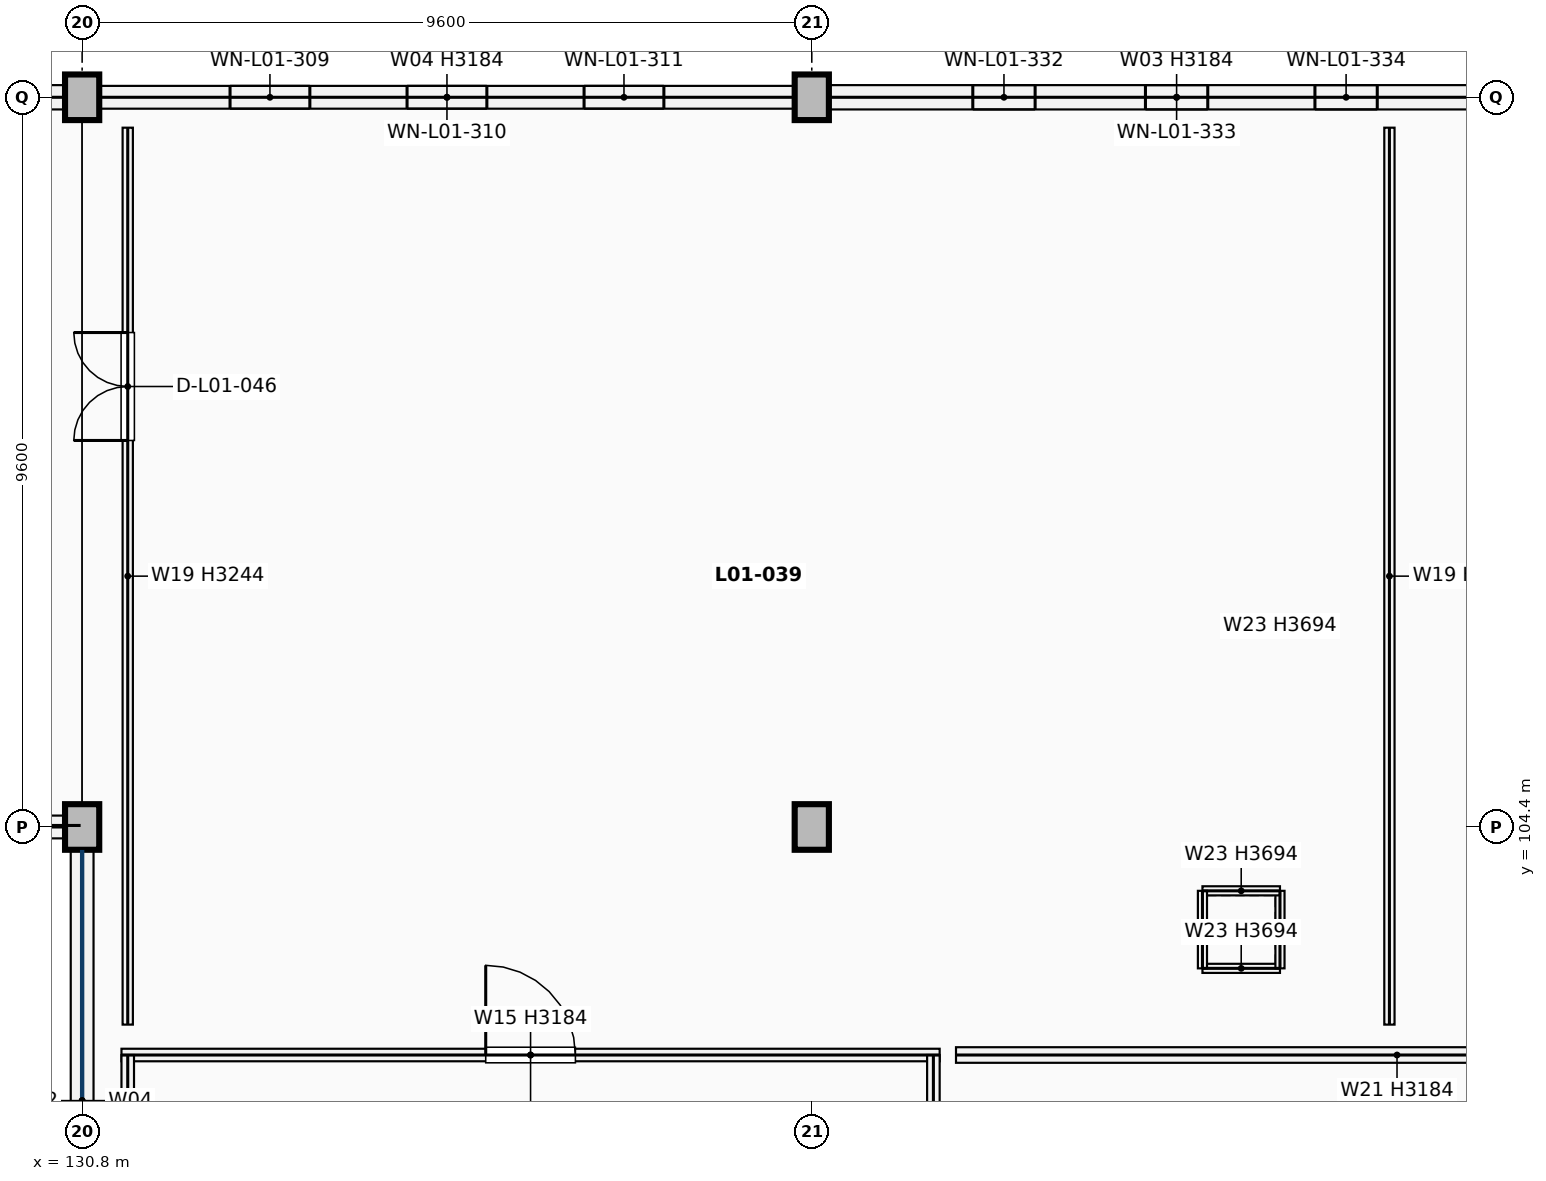
"""IFC4 building model, lengths in metres.
Left out: names, types, materials, properties, quantities, classifications, styles, units other than length and angle.
Written with IfcOpenShell. Run it as: python <this file> out.ifc"""

import sys

from ifc_helpers import new_model, si_unit, direction, frame, frame_2d, origin, origin_2d, place, context, subcontext, project, spatial, rectangle, extrude, element, fill, save


model = new_model("IFC4")
c1 = context("Model", 3, precision=1e-05, world=origin(), true_north=direction((0.0, 1.0)))
c2 = subcontext(c1, "Body", "Model", "MODEL_VIEW")
j1 = project(units=[si_unit("LENGTHUNIT", "METRE"), si_unit("PLANEANGLEUNIT", "RADIAN")], contexts=[c1])
p1 = place(None, origin())
s1 = spatial("IfcSite", under=j1, at=p1, CompositionType="ELEMENT")
p2 = place(p1, origin())
s2 = spatial("IfcBuilding", under=s1, at=p2, CompositionType="ELEMENT")
p3 = place(p2, frame((0.0, 0.0, 5.1)))
s3 = spatial("IfcBuildingStorey", under=s2, at=p3, CompositionType="ELEMENT", Elevation=5.1)
for number, where, z_axis, x_axis in (
    (1, (130.8, 104.4, 0.0), (0.0, 0.0, 1.0), (1.0, 0.0, 0.0)),
    (2, (130.8, 114.0, 0.0), (0.0, 0.0, 1.0), (1.0, 0.0, 0.0)),
    (3, (140.4, 104.4, 0.0), (0.0, 0.0, 1.0), (1.0, 0.0, 0.0)),
    (4, (140.4, 114.0, 0.0), (0.0, 0.0, 1.0), (1.0, 0.0, 0.0)),
):
    element("IfcColumn", number, at=place(p3, frame(where, z_axis=z_axis, x_axis=x_axis)), inside=s3, PredefinedType="COLUMN", context=c2, shape_type="SweptSolid", body=[
        extrude(rectangle(XDim=0.45, YDim=0.6, at=origin_2d()), origin(), (0.0, 0.0, 1.0), 4.42),
    ])
p4 = place(p3, frame((127.427, 114.0, 0.0), z_axis=(0.0, 0.0, 1.0), x_axis=(1.0, 0.0, 0.0)))
e5 = element("IfcWall", 5, at=p4, inside=s3, PredefinedType="SOLIDWALL", context=c2, shape_type="SweptSolid", body=[
    extrude(rectangle(XDim=3.146, YDim=0.32, at=frame_2d((1.573, 0.0))), origin(), (0.0, 0.0, 1.0), 3.184),
])
p5 = place(p4, frame((1.048, 0.0, 0.75)))
e6 = element("IfcOpeningElement", 6, at=p5, cuts=e5, PredefinedType="OPENING", context=c2, shape_type="SweptSolid", body=[
    extrude(rectangle(XDim=1.05, YDim=1.9, at=frame_2d((0.525, 0.95))), frame((0.0, 0.17, 0.0), z_axis=(0.0, -1.0, 0.0), x_axis=(1.0, 0.0, 0.0)), (0.0, 0.0, 1.0), 0.34),
])
p6 = place(p3, frame((131.027, 114.0, 0.0), z_axis=(0.0, 0.0, 1.0), x_axis=(1.0, 0.0, 0.0)))
e7 = element("IfcWall", 7, at=p6, inside=s3, PredefinedType="SOLIDWALL", context=c2, shape_type="SweptSolid", body=[
    extrude(rectangle(XDim=9.146, YDim=0.3, at=frame_2d((4.573, 0.0))), origin(), (0.0, 0.0, 1.0), 3.184),
])
p7 = place(p6, frame((1.719, 0.0, 0.75)))
e8 = element("IfcOpeningElement", 8, at=p7, cuts=e7, PredefinedType="OPENING", context=c2, shape_type="SweptSolid", body=[
    extrude(rectangle(XDim=1.05, YDim=1.7, at=frame_2d((0.525, 0.85))), frame((0.0, 0.16, 0.0), z_axis=(0.0, -1.0, 0.0), x_axis=(1.0, 0.0, 0.0)), (0.0, 0.0, 1.0), 0.32),
])
p8 = place(p6, frame((4.048, 0.0, 0.75)))
e9 = element("IfcOpeningElement", 9, at=p8, cuts=e7, PredefinedType="OPENING", context=c2, shape_type="SweptSolid", body=[
    extrude(rectangle(XDim=1.05, YDim=1.7, at=frame_2d((0.525, 0.85))), frame((0.0, 0.16, 0.0), z_axis=(0.0, -1.0, 0.0), x_axis=(1.0, 0.0, 0.0)), (0.0, 0.0, 1.0), 0.32),
])
p9 = place(p6, frame((6.377, 0.0, 0.75)))
e10 = element("IfcOpeningElement", 10, at=p9, cuts=e7, PredefinedType="OPENING", context=c2, shape_type="SweptSolid", body=[
    extrude(rectangle(XDim=1.05, YDim=1.7, at=frame_2d((0.525, 0.85))), frame((0.0, 0.16, 0.0), z_axis=(0.0, -1.0, 0.0), x_axis=(1.0, 0.0, 0.0)), (0.0, 0.0, 1.0), 0.32),
])
p10 = place(p3, frame((140.627, 114.0, 0.0), z_axis=(0.0, 0.0, 1.0), x_axis=(1.0, 0.0, 0.0)))
e11 = element("IfcWall", 11, at=p10, inside=s3, PredefinedType="SOLIDWALL", context=c2, shape_type="SweptSolid", body=[
    extrude(rectangle(XDim=9.146, YDim=0.32, at=frame_2d((4.573, 0.0))), origin(), (0.0, 0.0, 1.0), 3.184),
])
p11 = place(p10, frame((1.892, 0.0, 0.75)))
e12 = element("IfcOpeningElement", 12, at=p11, cuts=e11, PredefinedType="OPENING", context=c2, shape_type="SweptSolid", body=[
    extrude(rectangle(XDim=0.82, YDim=2.22, at=frame_2d((0.41, 1.11))), frame((0.0, 0.17, 0.0), z_axis=(0.0, -1.0, 0.0), x_axis=(1.0, 0.0, 0.0)), (0.0, 0.0, 1.0), 0.34),
])
p12 = place(p10, frame((4.163, 0.0, 0.75)))
e13 = element("IfcOpeningElement", 13, at=p12, cuts=e11, PredefinedType="OPENING", context=c2, shape_type="SweptSolid", body=[
    extrude(rectangle(XDim=0.82, YDim=2.22, at=frame_2d((0.41, 1.11))), frame((0.0, 0.17, 0.0), z_axis=(0.0, -1.0, 0.0), x_axis=(1.0, 0.0, 0.0)), (0.0, 0.0, 1.0), 0.34),
])
p13 = place(p10, frame((6.393, 0.0, 0.75)))
e14 = element("IfcOpeningElement", 14, at=p13, cuts=e11, PredefinedType="OPENING", context=c2, shape_type="SweptSolid", body=[
    extrude(rectangle(XDim=0.82, YDim=2.22, at=frame_2d((0.41, 1.11))), frame((0.0, 0.17, 0.0), z_axis=(0.0, -1.0, 0.0), x_axis=(1.0, 0.0, 0.0)), (0.0, 0.0, 1.0), 0.34),
])
p14 = place(p3, frame((130.8, 97.502, 0.0), z_axis=(0.0, 0.0, 1.0), x_axis=(0.0, 1.0, 0.0)))
e15 = element("IfcWall", 15, at=p14, inside=s3, PredefinedType="SOLIDWALL", context=c2, shape_type="SweptSolid", body=[
    extrude(rectangle(XDim=6.596, YDim=0.3, at=frame_2d((3.298, 0.0))), origin(), (0.0, 0.0, 1.0), 0.85),
])
p15 = place(p3, frame((127.577, 104.4, 0.0), z_axis=(0.0, 0.0, 1.0), x_axis=(1.0, 0.0, 0.0)))
e16 = element("IfcWall", 16, at=p15, inside=s3, PredefinedType="SOLIDWALL", context=c2, shape_type="SweptSolid", body=[
    extrude(rectangle(XDim=2.996, YDim=0.3, at=frame_2d((1.498, 0.0))), origin(), (0.0, 0.0, 1.0), 3.024),
])
p16 = place(p15, frame((1.048, 0.0, 0.75)))
e17 = element("IfcOpeningElement", 17, at=p16, cuts=e16, PredefinedType="OPENING", context=c2, shape_type="SweptSolid", body=[
    extrude(rectangle(XDim=0.9, YDim=1.75, at=frame_2d((0.45, 0.875))), frame((0.0, 0.16, 0.0), z_axis=(0.0, -1.0, 0.0), x_axis=(1.0, 0.0, 0.0)), (0.0, 0.0, 1.0), 0.32),
])
for number, where, z_axis, x_axis in (
    (18, (145.54, 102.54, 0.0), (0.0, 0.0, 1.0), (1.0, 0.0, 0.0)),
    (19, (146.56, 102.54, 0.0), (0.0, 0.0, 1.0), (0.0, 1.0, 0.0)),
    (20, (146.56, 103.56, 0.0), (0.0, 0.0, 1.0), (-1.0, 0.0, 0.0)),
    (21, (145.54, 103.56, 0.0), (0.0, 0.0, 1.0), (0.0, -1.0, 0.0)),
):
    element("IfcWall", number, at=place(p3, frame(where, z_axis=z_axis, x_axis=x_axis)), inside=s3, PredefinedType="PARTITIONING", context=c2, shape_type="SweptSolid", body=[
        extrude(rectangle(XDim=1.02, YDim=0.12, at=frame_2d((0.51, 0.0))), origin(), (0.0, 0.0, 1.0), 3.694),
    ])
p17 = place(p3, frame((131.317, 101.4, 0.0), z_axis=(0.0, 0.0, 1.0), x_axis=(1.0, 0.0, 0.0)))
e22 = element("IfcWall", 22, at=p17, inside=s3, PredefinedType="PARTITIONING", context=c2, shape_type="SweptSolid", body=[
    extrude(rectangle(XDim=10.765, YDim=0.165, at=frame_2d((5.383, 0.0))), origin(), (0.0, 0.0, 1.0), 3.184),
])
p18 = place(p17, frame((4.792, 0.0, 0.0)))
e23 = element("IfcOpeningElement", 23, at=p18, cuts=e22, PredefinedType="OPENING", context=c2, shape_type="SweptSolid", body=[
    extrude(rectangle(XDim=1.18, YDim=2.14, at=frame_2d((0.59, 1.07))), frame((0.0, 0.093, 0.0), z_axis=(0.0, -1.0, 0.0), x_axis=(1.0, 0.0, 0.0)), (0.0, 0.0, 1.0), 0.185),
])
for number, where, z_axis, x_axis in (
    (24, (131.4, 89.2, 0.0), (0.0, 0.0, 1.0), (0.0, 1.0, 0.0)),
    (25, (142.0, 89.2, 0.0), (0.0, 0.0, 1.0), (0.0, 1.0, 0.0)),
):
    element("IfcWall", number, at=place(p3, frame(where, z_axis=z_axis, x_axis=x_axis)), inside=s3, PredefinedType="PARTITIONING", context=c2, shape_type="SweptSolid", body=[
        extrude(rectangle(XDim=12.2, YDim=0.165, at=frame_2d((6.1, 0.0))), origin(), (0.0, 0.0, 1.0), 3.244),
    ])
p19 = place(p3, frame((131.4, 101.8, 0.0), z_axis=(0.0, 0.0, 1.0), x_axis=(0.0, 1.0, 0.0)))
e26 = element("IfcWall", 26, at=p19, inside=s3, PredefinedType="PARTITIONING", context=c2, shape_type="SweptSolid", body=[
    extrude(rectangle(XDim=11.8, YDim=0.135, at=frame_2d((5.9, 0.0))), origin(), (0.0, 0.0, 1.0), 3.244),
])
p20 = place(p19, frame((7.685, 0.0, 0.0)))
e27 = element("IfcOpeningElement", 27, at=p20, cuts=e26, PredefinedType="OPENING", context=c2, shape_type="SweptSolid", body=[
    extrude(rectangle(XDim=1.42, YDim=2.26, at=frame_2d((0.71, 1.13))), frame((0.0, 0.078, 0.0), z_axis=(0.0, -1.0, 0.0), x_axis=(1.0, 0.0, 0.0)), (0.0, 0.0, 1.0), 0.155),
])
p21 = place(p3, frame((148.0, 101.8, 0.0), z_axis=(0.0, 0.0, 1.0), x_axis=(0.0, 1.0, 0.0)))
e28 = element("IfcWall", 28, at=p21, inside=s3, PredefinedType="PARTITIONING", context=c2, shape_type="SweptSolid", body=[
    extrude(rectangle(XDim=11.8, YDim=0.135, at=frame_2d((5.9, 0.0))), origin(), (0.0, 0.0, 1.0), 3.244),
])
p22 = place(p3, frame((142.298, 101.4, 0.0), z_axis=(0.0, 0.0, 1.0), x_axis=(1.0, 0.0, 0.0)))
e29 = element("IfcWall", 29, at=p22, inside=s3, PredefinedType="PARTITIONING", context=c2, shape_type="SweptSolid", body=[
    extrude(rectangle(XDim=11.605, YDim=0.205, at=frame_2d((5.802, 0.0))), origin(), (0.0, 0.0, 1.0), 3.184),
])
p23 = place(p7, origin())
e30 = element("IfcWindow", 30, at=p23, inside=s3, PartitioningType="SINGLE_PANEL", PredefinedType="WINDOW", context=c2, shape_type="SweptSolid", body=[
    extrude(rectangle(XDim=1.05, YDim=1.7, at=frame_2d((0.525, 0.85))), frame((0.0, 0.03, 0.0), z_axis=(0.0, -1.0, 0.0), x_axis=(1.0, 0.0, 0.0)), (0.0, 0.0, 1.0), 0.06),
])
fill(e8, e30)
p24 = place(p8, origin())
e31 = element("IfcWindow", 31, at=p24, inside=s3, PartitioningType="SINGLE_PANEL", PredefinedType="WINDOW", context=c2, shape_type="SweptSolid", body=[
    extrude(rectangle(XDim=1.05, YDim=1.7, at=frame_2d((0.525, 0.85))), frame((0.0, 0.03, 0.0), z_axis=(0.0, -1.0, 0.0), x_axis=(1.0, 0.0, 0.0)), (0.0, 0.0, 1.0), 0.06),
])
fill(e9, e31)
p25 = place(p9, origin())
e32 = element("IfcWindow", 32, at=p25, inside=s3, PartitioningType="SINGLE_PANEL", PredefinedType="WINDOW", context=c2, shape_type="SweptSolid", body=[
    extrude(rectangle(XDim=1.05, YDim=1.7, at=frame_2d((0.525, 0.85))), frame((0.0, 0.03, 0.0), z_axis=(0.0, -1.0, 0.0), x_axis=(1.0, 0.0, 0.0)), (0.0, 0.0, 1.0), 0.06),
])
fill(e10, e32)
p26 = place(p11, origin())
e33 = element("IfcWindow", 33, at=p26, inside=s3, PartitioningType="SINGLE_PANEL", PredefinedType="WINDOW", context=c2, shape_type="SweptSolid", body=[
    extrude(rectangle(XDim=0.82, YDim=2.22, at=frame_2d((0.41, 1.11))), frame((0.0, 0.03, 0.0), z_axis=(0.0, -1.0, 0.0), x_axis=(1.0, 0.0, 0.0)), (0.0, 0.0, 1.0), 0.06),
])
fill(e12, e33)
p27 = place(p12, origin())
e34 = element("IfcWindow", 34, at=p27, inside=s3, PartitioningType="SINGLE_PANEL", PredefinedType="WINDOW", context=c2, shape_type="SweptSolid", body=[
    extrude(rectangle(XDim=0.82, YDim=2.22, at=frame_2d((0.41, 1.11))), frame((0.0, 0.03, 0.0), z_axis=(0.0, -1.0, 0.0), x_axis=(1.0, 0.0, 0.0)), (0.0, 0.0, 1.0), 0.06),
])
fill(e13, e34)
p28 = place(p13, origin())
e35 = element("IfcWindow", 35, at=p28, inside=s3, PartitioningType="SINGLE_PANEL", PredefinedType="WINDOW", context=c2, shape_type="SweptSolid", body=[
    extrude(rectangle(XDim=0.82, YDim=2.22, at=frame_2d((0.41, 1.11))), frame((0.0, 0.03, 0.0), z_axis=(0.0, -1.0, 0.0), x_axis=(1.0, 0.0, 0.0)), (0.0, 0.0, 1.0), 0.06),
])
fill(e14, e35)
p29 = place(p18, origin())
e36 = element("IfcDoor", 36, at=p29, inside=s3, OperationType="SINGLE_SWING_LEFT", PredefinedType="DOOR", context=c2, shape_type="SweptSolid", body=[
    extrude(rectangle(XDim=1.18, YDim=2.14, at=frame_2d((0.59, 1.07))), frame((0.0, 0.025, 0.0), z_axis=(0.0, -1.0, 0.0), x_axis=(1.0, 0.0, 0.0)), (0.0, 0.0, 1.0), 0.05),
])
fill(e23, e36)
p30 = place(p20, origin())
e37 = element("IfcDoor", 37, at=p30, inside=s3, OperationType="DOUBLE_DOOR_SINGLE_SWING", PredefinedType="DOOR", context=c2, shape_type="SweptSolid", body=[
    extrude(rectangle(XDim=1.42, YDim=2.26, at=frame_2d((0.71, 1.13))), frame((0.0, 0.025, 0.0), z_axis=(0.0, -1.0, 0.0), x_axis=(1.0, 0.0, 0.0)), (0.0, 0.0, 1.0), 0.05),
])
fill(e27, e37)
save(model, sys.argv[1])
